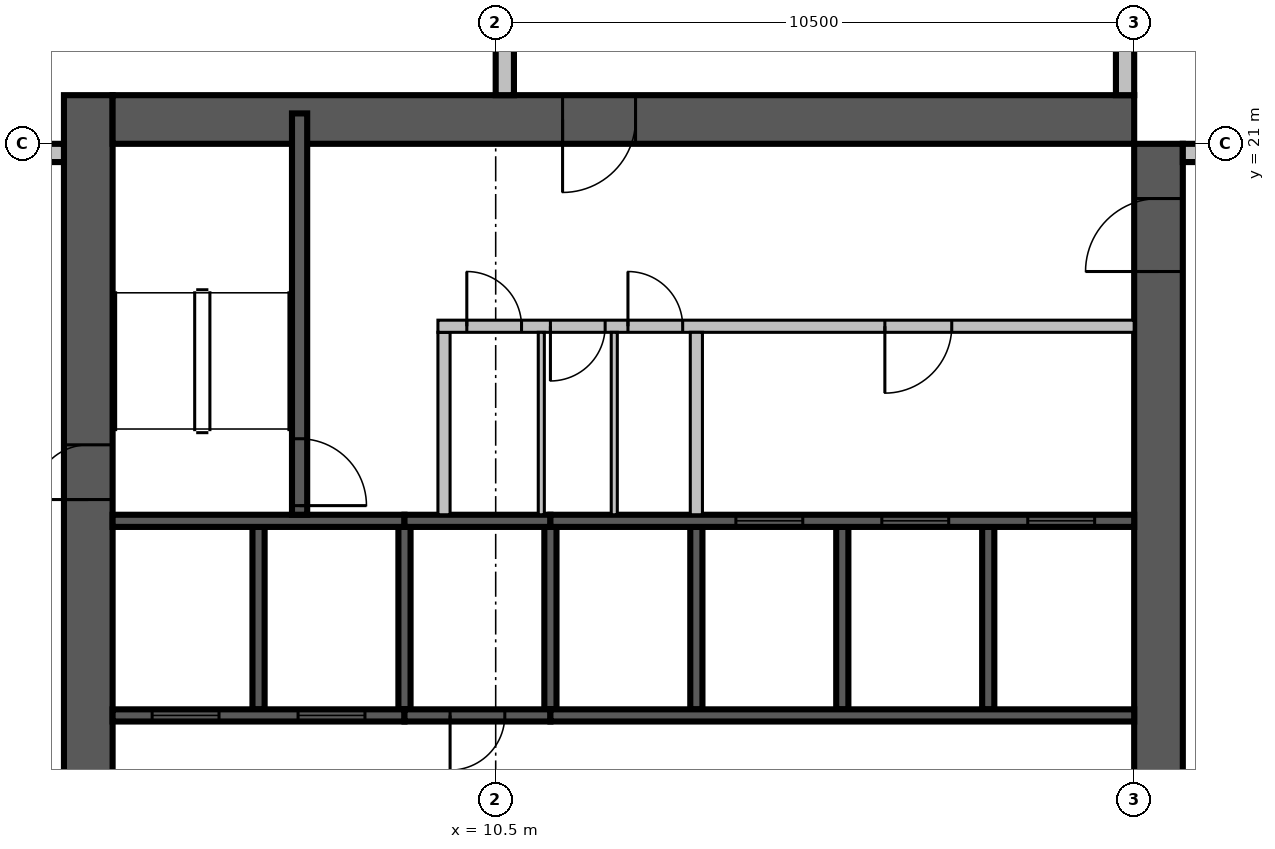
"""IFC4 building model, lengths in metres.
Left out: names, types, materials, properties, quantities, classifications, styles, units other than length and angle.
Written with IfcOpenShell. Run it as: python <this file> out.ifc"""

import sys

from ifc_helpers import new_model, si_unit, direction, frame, frame_2d, origin, place, context, subcontext, project, spatial, rectangle, extrude, source, transform, mapped, element, fill, save


model = new_model("IFC4")
c1 = context("Model", 3, precision=1e-05, world=origin(), true_north=direction((0.0, 1.0)))
c2 = subcontext(c1, "Body", "Model", "MODEL_VIEW")
j1 = project(units=[si_unit("LENGTHUNIT", "METRE"), si_unit("PLANEANGLEUNIT", "RADIAN")], contexts=[c1])
p1 = place(None, origin())
s1 = spatial("IfcSite", under=j1, at=p1, CompositionType="ELEMENT")
p2 = place(p1, origin())
s2 = spatial("IfcBuilding", under=s1, at=p2, CompositionType="ELEMENT")
p3 = place(p2, frame((0.0, 0.0, 193.0)))
s3 = spatial("IfcBuildingStorey", under=s2, at=p3, CompositionType="ELEMENT", Elevation=193.0)
m1 = source(origin(), c2, "Body", "SweptSolid", [
    extrude(rectangle(XDim=17.6, YDim=0.8, at=frame_2d((8.8, 0.0))), origin(), (0.0, 0.0, 1.0), 3.8),
])
p4 = place(p3, frame((3.8, 4.2, 0.0), z_axis=(0.0, 0.0, 1.0), x_axis=(0.0, 1.0, 0.0)))
e1 = element("IfcWall", 1, at=p4, inside=s3, PredefinedType="SHEAR", context=c2, shape_type="MappedRepresentation", body=[
    mapped(m1, transform((0.0, 0.0, 0.0), scale=1.0)),
])
m2 = source(origin(), c2, "Body", "SweptSolid", [
    extrude(rectangle(XDim=2.2, YDim=2.1, at=frame_2d((1.1, 1.05))), frame((0.0, 0.41, 0.0), z_axis=(0.0, -1.0, 0.0), x_axis=(1.0, 0.0, 0.0)), (0.0, 0.0, 1.0), 0.82),
])
p5 = place(p4, frame((4.2, 0.0, 0.0)))
e2 = element("IfcOpeningElement", 2, at=p5, cuts=e1, PredefinedType="OPENING", context=c2, shape_type="MappedRepresentation", body=[
    mapped(m2, transform((0.0, 0.0, 0.0), scale=1.0)),
])
m3 = source(origin(), c2, "Body", "SweptSolid", [
    extrude(rectangle(XDim=0.9, YDim=2.1, at=frame_2d((0.45, 1.05))), frame((0.0, 0.41, 0.0), z_axis=(0.0, -1.0, 0.0), x_axis=(1.0, 0.0, 0.0)), (0.0, 0.0, 1.0), 0.82),
])
p6 = place(p4, frame((10.95, 0.0, 0.0)))
e3 = element("IfcOpeningElement", 3, at=p6, cuts=e1, PredefinedType="OPENING", context=c2, shape_type="MappedRepresentation", body=[
    mapped(m3, transform((0.0, 0.0, 0.0), scale=1.0)),
])
m4 = source(origin(), c2, "Body", "SweptSolid", [
    extrude(rectangle(XDim=16.8, YDim=0.8, at=frame_2d((8.4, 0.0))), origin(), (0.0, 0.0, 1.0), 3.8),
])
p7 = place(p3, frame((21.4, 4.2, 0.0), z_axis=(0.0, 0.0, 1.0), x_axis=(0.0, 1.0, 0.0)))
e4 = element("IfcWall", 4, at=p7, inside=s3, PredefinedType="SHEAR", context=c2, shape_type="MappedRepresentation", body=[
    mapped(m4, transform((0.0, 0.0, 0.0), scale=1.0)),
])
p8 = place(p7, frame((4.2, 0.0, 0.0)))
e5 = element("IfcOpeningElement", 5, at=p8, cuts=e4, PredefinedType="OPENING", context=c2, shape_type="MappedRepresentation", body=[
    mapped(m2, transform((0.0, 0.0, 0.0), scale=1.0)),
])
m5 = source(origin(), c2, "Body", "SweptSolid", [
    extrude(rectangle(XDim=1.2, YDim=2.1, at=frame_2d((0.6, 1.05))), frame((0.0, 0.41, 0.0), z_axis=(0.0, -1.0, 0.0), x_axis=(1.0, 0.0, 0.0)), (0.0, 0.0, 1.0), 0.82),
])
p9 = place(p7, frame((14.7, 0.0, 0.0)))
e6 = element("IfcOpeningElement", 6, at=p9, cuts=e4, PredefinedType="OPENING", context=c2, shape_type="MappedRepresentation", body=[
    mapped(m5, transform((0.0, 0.0, 0.0), scale=1.0)),
])
p10 = place(p3, frame((4.2, 21.4, 0.0), z_axis=(0.0, 0.0, 1.0), x_axis=(1.0, 0.0, 0.0)))
e7 = element("IfcWall", 7, at=p10, inside=s3, PredefinedType="SHEAR", context=c2, shape_type="MappedRepresentation", body=[
    mapped(m4, transform((0.0, 0.0, 0.0), scale=1.0)),
])
p11 = place(p10, frame((7.4, 0.0, 0.0)))
e8 = element("IfcOpeningElement", 8, at=p11, cuts=e7, PredefinedType="OPENING", context=c2, shape_type="MappedRepresentation", body=[
    mapped(m5, transform((0.0, 0.0, 0.0), scale=1.0)),
])
m6 = source(origin(), c2, "Body", "SweptSolid", [
    extrude(rectangle(XDim=7.15, YDim=0.3, at=frame_2d((3.575, 0.0))), origin(), (0.0, 0.0, 1.0), 3.4),
])
p12 = place(p3, frame((28.95, 20.85, 0.0), z_axis=(0.0, 0.0, 1.0), x_axis=(-1.0, 0.0, 0.0)))
e9 = element("IfcWall", 9, at=p12, inside=s3, PredefinedType="STANDARD", context=c2, shape_type="MappedRepresentation", body=[
    mapped(m6, transform((0.0, 0.0, 0.0), scale=1.0)),
])
m7 = source(origin(), c2, "Body", "SweptSolid", [
    extrude(rectangle(XDim=3.0, YDim=2.3, at=frame_2d((1.5, 1.15))), frame((0.0, 0.16, 0.0), z_axis=(0.0, -1.0, 0.0), x_axis=(1.0, 0.0, 0.0)), (0.0, 0.0, 1.0), 0.32),
])
p13 = place(p12, frame((0.15, 0.0, 0.6)))
e10 = element("IfcOpeningElement", 10, at=p13, cuts=e9, PredefinedType="OPENING", context=c2, shape_type="MappedRepresentation", body=[
    mapped(m7, transform((0.0, 0.0, 0.0), scale=1.0)),
])
p14 = place(p3, frame((20.85, 21.8, 0.0), z_axis=(0.0, 0.0, 1.0), x_axis=(0.0, 1.0, 0.0)))
e11 = element("IfcWall", 11, at=p14, inside=s3, PredefinedType="STANDARD", context=c2, shape_type="MappedRepresentation", body=[
    mapped(m6, transform((0.0, 0.0, 0.0), scale=1.0)),
])
p15 = place(p14, frame((4.0, 0.0, 0.6)))
e12 = element("IfcOpeningElement", 12, at=p15, cuts=e11, PredefinedType="OPENING", context=c2, shape_type="MappedRepresentation", body=[
    mapped(m7, transform((0.0, 0.0, 0.0), scale=1.0)),
])
p16 = place(p3, frame((10.65, 28.95, 0.0), z_axis=(0.0, 0.0, 1.0), x_axis=(0.0, -1.0, 0.0)))
e13 = element("IfcWall", 13, at=p16, inside=s3, PredefinedType="STANDARD", context=c2, shape_type="MappedRepresentation", body=[
    mapped(m6, transform((0.0, 0.0, 0.0), scale=1.0)),
])
m8 = source(origin(), c2, "Body", "SweptSolid", [
    extrude(rectangle(XDim=1.8, YDim=2.3, at=frame_2d((0.9, 1.15))), frame((0.0, 0.16, 0.0), z_axis=(0.0, -1.0, 0.0), x_axis=(1.0, 0.0, 0.0)), (0.0, 0.0, 1.0), 0.32),
])
p17 = place(p16, frame((0.15, 0.0, 0.6)))
e14 = element("IfcOpeningElement", 14, at=p17, cuts=e13, PredefinedType="OPENING", context=c2, shape_type="MappedRepresentation", body=[
    mapped(m8, transform((0.0, 0.0, 0.0), scale=1.0)),
])
m9 = source(origin(), c2, "Body", "SweptSolid", [
    extrude(rectangle(XDim=1.2, YDim=2.3, at=frame_2d((0.6, 1.15))), frame((0.0, 0.16, 0.0), z_axis=(0.0, -1.0, 0.0), x_axis=(1.0, 0.0, 0.0)), (0.0, 0.0, 1.0), 0.32),
])
p18 = place(p16, frame((3.612, 0.0, 0.6)))
e15 = element("IfcOpeningElement", 15, at=p18, cuts=e13, PredefinedType="OPENING", context=c2, shape_type="MappedRepresentation", body=[
    mapped(m9, transform((0.0, 0.0, 0.0), scale=1.0)),
])
m10 = source(origin(), c2, "Body", "SweptSolid", [
    extrude(rectangle(XDim=2.5, YDim=0.3, at=frame_2d((1.25, 0.0))), origin(), (0.0, 0.0, 1.0), 3.4),
])
p19 = place(p3, frame((3.4, 20.85, 0.0), z_axis=(0.0, 0.0, 1.0), x_axis=(-1.0, 0.0, 0.0)))
e16 = element("IfcWall", 16, at=p19, inside=s3, PredefinedType="STANDARD", context=c2, shape_type="MappedRepresentation", body=[
    mapped(m10, transform((0.0, 0.0, 0.0), scale=1.0)),
])
p20 = place(p19, frame((0.4, 0.0, 0.6)))
e17 = element("IfcOpeningElement", 17, at=p20, cuts=e16, PredefinedType="OPENING", context=c2, shape_type="MappedRepresentation", body=[
    mapped(m8, transform((0.0, 0.0, 0.0), scale=1.0)),
])
m11 = source(origin(), c2, "Body", "SweptSolid", [
    extrude(rectangle(XDim=3.0, YDim=0.2, at=frame_2d((1.5, 0.0))), origin(), (0.0, 0.0, 1.0), 3.8),
])
p21 = place(p3, frame((6.6, 11.7, 0.0), z_axis=(0.0, 0.0, 1.0), x_axis=(0.0, 1.0, 0.0)))
e18 = element("IfcWall", 18, at=p21, inside=s3, PredefinedType="SOLIDWALL", context=c2, shape_type="MappedRepresentation", body=[
    mapped(m11, transform((0.0, 0.0, 0.0), scale=1.0)),
])
m12 = source(origin(), c2, "Body", "SweptSolid", [
    extrude(rectangle(XDim=3.0, YDim=0.2, at=frame_2d((1.5, 0.0))), origin(), (0.0, 0.0, 1.0), 3.4),
])
for number, where, z_axis, x_axis in (
    (19, (9.0, 11.7, 0.0), (0.0, 0.0, 1.0), (0.0, 1.0, 0.0)),
    (20, (11.4, 11.7, 0.0), (0.0, 0.0, 1.0), (0.0, 1.0, 0.0)),
):
    element("IfcWall", number, at=place(p3, frame(where, z_axis=z_axis, x_axis=x_axis)), inside=s3, PredefinedType="SOLIDWALL", context=c2, shape_type="MappedRepresentation", body=[
        mapped(m12, transform((0.0, 0.0, 0.0), scale=1.0)),
    ])
for number, where, z_axis, x_axis in (
    (21, (13.8, 11.7, 0.0), (0.0, 0.0, 1.0), (0.0, 1.0, 0.0)),
    (22, (16.2, 11.7, 0.0), (0.0, 0.0, 1.0), (0.0, 1.0, 0.0)),
    (23, (18.6, 11.7, 0.0), (0.0, 0.0, 1.0), (0.0, 1.0, 0.0)),
):
    element("IfcWall", number, at=place(p3, frame(where, z_axis=z_axis, x_axis=x_axis)), inside=s3, PredefinedType="SOLIDWALL", context=c2, shape_type="MappedRepresentation", body=[
        mapped(m11, transform((0.0, 0.0, 0.0), scale=1.0)),
    ])
m13 = source(origin(), c2, "Body", "SweptSolid", [
    extrude(rectangle(XDim=4.8, YDim=0.2, at=frame_2d((2.4, 0.0))), origin(), (0.0, 0.0, 1.0), 3.8),
])
p22 = place(p3, frame((4.2, 11.6, 0.0), z_axis=(0.0, 0.0, 1.0), x_axis=(1.0, 0.0, 0.0)))
e24 = element("IfcWall", 24, at=p22, inside=s3, PredefinedType="SOLIDWALL", context=c2, shape_type="MappedRepresentation", body=[
    mapped(m13, transform((0.0, 0.0, 0.0), scale=1.0)),
])
m14 = source(origin(), c2, "Body", "SweptSolid", [
    extrude(rectangle(XDim=1.1, YDim=2.1, at=frame_2d((0.55, 1.05))), frame((0.0, 0.11, 0.0), z_axis=(0.0, -1.0, 0.0), x_axis=(1.0, 0.0, 0.0)), (0.0, 0.0, 1.0), 0.22),
])
p23 = place(p22, frame((0.65, 0.0, 0.0)))
e25 = element("IfcOpeningElement", 25, at=p23, cuts=e24, PredefinedType="OPENING", context=c2, shape_type="MappedRepresentation", body=[
    mapped(m14, transform((0.0, 0.0, 0.0), scale=1.0)),
])
p24 = place(p22, frame((3.05, 0.0, 0.0)))
e26 = element("IfcOpeningElement", 26, at=p24, cuts=e24, PredefinedType="OPENING", context=c2, shape_type="MappedRepresentation", body=[
    mapped(m14, transform((0.0, 0.0, 0.0), scale=1.0)),
])
m15 = source(origin(), c2, "Body", "SweptSolid", [
    extrude(rectangle(XDim=2.4, YDim=0.2, at=frame_2d((1.2, 0.0))), origin(), (0.0, 0.0, 1.0), 3.4),
])
p25 = place(p3, frame((9.0, 11.6, 0.0), z_axis=(0.0, 0.0, 1.0), x_axis=(1.0, 0.0, 0.0)))
e27 = element("IfcWall", 27, at=p25, inside=s3, PredefinedType="SOLIDWALL", context=c2, shape_type="MappedRepresentation", body=[
    mapped(m15, transform((0.0, 0.0, 0.0), scale=1.0)),
])
m16 = source(origin(), c2, "Body", "SweptSolid", [
    extrude(rectangle(XDim=0.9, YDim=2.1, at=frame_2d((0.45, 1.05))), frame((0.0, 0.11, 0.0), z_axis=(0.0, -1.0, 0.0), x_axis=(1.0, 0.0, 0.0)), (0.0, 0.0, 1.0), 0.22),
])
p26 = place(p25, frame((0.75, 0.0, 0.0)))
e28 = element("IfcOpeningElement", 28, at=p26, cuts=e27, PredefinedType="OPENING", context=c2, shape_type="MappedRepresentation", body=[
    mapped(m16, transform((0.0, 0.0, 0.0), scale=1.0)),
])
m17 = source(origin(), c2, "Body", "SweptSolid", [
    extrude(rectangle(XDim=9.6, YDim=0.2, at=frame_2d((4.8, 0.0))), origin(), (0.0, 0.0, 1.0), 3.8),
])
p27 = place(p3, frame((11.4, 11.6, 0.0), z_axis=(0.0, 0.0, 1.0), x_axis=(1.0, 0.0, 0.0)))
e29 = element("IfcWall", 29, at=p27, inside=s3, PredefinedType="SOLIDWALL", context=c2, shape_type="MappedRepresentation", body=[
    mapped(m17, transform((0.0, 0.0, 0.0), scale=1.0)),
])
p28 = place(p3, frame((4.2, 14.8, 0.0), z_axis=(0.0, 0.0, 1.0), x_axis=(1.0, 0.0, 0.0)))
e30 = element("IfcWall", 30, at=p28, inside=s3, PredefinedType="SOLIDWALL", context=c2, shape_type="MappedRepresentation", body=[
    mapped(m13, transform((0.0, 0.0, 0.0), scale=1.0)),
])
p29 = place(p3, frame((9.0, 14.8, 0.0), z_axis=(0.0, 0.0, 1.0), x_axis=(1.0, 0.0, 0.0)))
e31 = element("IfcWall", 31, at=p29, inside=s3, PredefinedType="SOLIDWALL", context=c2, shape_type="MappedRepresentation", body=[
    mapped(m15, transform((0.0, 0.0, 0.0), scale=1.0)),
])
p30 = place(p3, frame((11.4, 14.8, 0.0), z_axis=(0.0, 0.0, 1.0), x_axis=(1.0, 0.0, 0.0)))
e32 = element("IfcWall", 32, at=p30, inside=s3, PredefinedType="SOLIDWALL", context=c2, shape_type="MappedRepresentation", body=[
    mapped(m17, transform((0.0, 0.0, 0.0), scale=1.0)),
])
p31 = place(p30, frame((3.05, 0.0, 0.0)))
e33 = element("IfcOpeningElement", 33, at=p31, cuts=e32, PredefinedType="OPENING", context=c2, shape_type="MappedRepresentation", body=[
    mapped(m14, transform((0.0, 0.0, 0.0), scale=1.0)),
])
p32 = place(p30, frame((5.45, 0.0, 0.0)))
e34 = element("IfcOpeningElement", 34, at=p32, cuts=e32, PredefinedType="OPENING", context=c2, shape_type="MappedRepresentation", body=[
    mapped(m14, transform((0.0, 0.0, 0.0), scale=1.0)),
])
p33 = place(p30, frame((7.85, 0.0, 0.0)))
e35 = element("IfcOpeningElement", 35, at=p33, cuts=e32, PredefinedType="OPENING", context=c2, shape_type="MappedRepresentation", body=[
    mapped(m14, transform((0.0, 0.0, 0.0), scale=1.0)),
])
m18 = source(origin(), c2, "Body", "SweptSolid", [
    extrude(rectangle(XDim=6.6, YDim=0.25, at=frame_2d((3.3, 0.0))), origin(), (0.0, 0.0, 1.0), 3.4),
])
p34 = place(p3, frame((7.275, 14.9, 0.0), z_axis=(0.0, 0.0, 1.0), x_axis=(0.0, 1.0, 0.0)))
e36 = element("IfcWall", 36, at=p34, inside=s3, PredefinedType="SOLIDWALL", context=c2, shape_type="MappedRepresentation", body=[
    mapped(m18, transform((0.0, 0.0, 0.0), scale=1.0)),
])
m19 = source(origin(), c2, "Body", "SweptSolid", [
    extrude(rectangle(XDim=1.1, YDim=2.1, at=frame_2d((0.55, 1.05))), frame((0.0, 0.135, 0.0), z_axis=(0.0, -1.0, 0.0), x_axis=(1.0, 0.0, 0.0)), (0.0, 0.0, 1.0), 0.27),
])
p35 = place(p34, frame((0.15, 0.0, 0.0)))
e37 = element("IfcOpeningElement", 37, at=p35, cuts=e36, PredefinedType="OPENING", context=c2, shape_type="MappedRepresentation", body=[
    mapped(m19, transform((0.0, 0.0, 0.0), scale=1.0)),
])
m20 = source(origin(), c2, "Body", "SweptSolid", [
    extrude(rectangle(XDim=3.0, YDim=0.2, at=frame_2d((1.5, 0.0))), origin(), (0.0, 0.0, 1.0), 3.4),
])
p36 = place(p3, frame((9.65, 14.9, 0.0), z_axis=(0.0, 0.0, 1.0), x_axis=(0.0, 1.0, 0.0)))
e38 = element("IfcWall", 38, at=p36, inside=s3, PredefinedType="PARTITIONING", context=c2, shape_type="MappedRepresentation", body=[
    mapped(m20, transform((0.0, 0.0, 0.0), scale=1.0)),
])
m21 = source(origin(), c2, "Body", "SweptSolid", [
    extrude(rectangle(XDim=11.45, YDim=0.2, at=frame_2d((5.725, 0.0))), origin(), (0.0, 0.0, 1.0), 3.4),
])
p37 = place(p3, frame((9.55, 18.0, 0.0), z_axis=(0.0, 0.0, 1.0), x_axis=(1.0, 0.0, 0.0)))
e39 = element("IfcWall", 39, at=p37, inside=s3, PredefinedType="PARTITIONING", context=c2, shape_type="MappedRepresentation", body=[
    mapped(m21, transform((0.0, 0.0, 0.0), scale=1.0)),
])
p38 = place(p37, frame((0.475, 0.0, 0.0)))
e40 = element("IfcOpeningElement", 40, at=p38, cuts=e39, PredefinedType="OPENING", context=c2, shape_type="MappedRepresentation", body=[
    mapped(m16, transform((0.0, 0.0, 0.0), scale=1.0)),
])
p39 = place(p37, frame((1.85, 0.0, 0.0)))
e41 = element("IfcOpeningElement", 41, at=p39, cuts=e39, PredefinedType="OPENING", context=c2, shape_type="MappedRepresentation", body=[
    mapped(m16, transform((0.0, 0.0, 0.0), scale=1.0)),
])
p40 = place(p37, frame((3.125, 0.0, 0.0)))
e42 = element("IfcOpeningElement", 42, at=p40, cuts=e39, PredefinedType="OPENING", context=c2, shape_type="MappedRepresentation", body=[
    mapped(m16, transform((0.0, 0.0, 0.0), scale=1.0)),
])
p41 = place(p37, frame((7.35, 0.0, 0.0)))
e43 = element("IfcOpeningElement", 43, at=p41, cuts=e39, PredefinedType="OPENING", context=c2, shape_type="MappedRepresentation", body=[
    mapped(m14, transform((0.0, 0.0, 0.0), scale=1.0)),
])
p42 = place(p3, frame((13.8, 14.9, 0.0), z_axis=(0.0, 0.0, 1.0), x_axis=(0.0, 1.0, 0.0)))
e44 = element("IfcWall", 44, at=p42, inside=s3, PredefinedType="PARTITIONING", context=c2, shape_type="MappedRepresentation", body=[
    mapped(m20, transform((0.0, 0.0, 0.0), scale=1.0)),
])
m22 = source(origin(), c2, "Body", "SweptSolid", [
    extrude(rectangle(XDim=3.0, YDim=0.1, at=frame_2d((1.5, 0.0))), origin(), (0.0, 0.0, 1.0), 3.4),
])
for number, where, z_axis, x_axis in (
    (45, (11.25, 14.9, 0.0), (0.0, 0.0, 1.0), (0.0, 1.0, 0.0)),
    (46, (12.45, 14.9, 0.0), (0.0, 0.0, 1.0), (0.0, 1.0, 0.0)),
):
    element("IfcWall", number, at=place(p3, frame(where, z_axis=z_axis, x_axis=x_axis)), inside=s3, PredefinedType="PARTITIONING", context=c2, shape_type="MappedRepresentation", body=[
        mapped(m22, transform((0.0, 0.0, 0.0), scale=1.0)),
    ])
m23 = source(origin(), c2, "Body", "SweptSolid", [
    extrude(rectangle(XDim=1.1, YDim=2.1, at=frame_2d((0.55, 1.05))), frame((0.0, 0.025, 0.0), z_axis=(0.0, -1.0, 0.0), x_axis=(1.0, 0.0, 0.0)), (0.0, 0.0, 1.0), 0.05),
])
p43 = place(p23, origin())
e47 = element("IfcDoor", 47, at=p43, inside=s3, OperationType="SLIDING_TO_LEFT", PredefinedType="DOOR", context=c2, shape_type="MappedRepresentation", body=[
    mapped(m23, transform((0.0, 0.0, 0.0), scale=1.0)),
])
fill(e25, e47)
p44 = place(p24, origin())
e48 = element("IfcDoor", 48, at=p44, inside=s3, OperationType="SLIDING_TO_LEFT", PredefinedType="DOOR", context=c2, shape_type="MappedRepresentation", body=[
    mapped(m23, transform((0.0, 0.0, 0.0), scale=1.0)),
])
fill(e26, e48)
m24 = source(origin(), c2, "Body", "SweptSolid", [
    extrude(rectangle(XDim=0.9, YDim=2.1, at=frame_2d((0.45, 1.05))), frame((0.0, 0.025, 0.0), z_axis=(0.0, -1.0, 0.0), x_axis=(1.0, 0.0, 0.0)), (0.0, 0.0, 1.0), 0.05),
])
p45 = place(p26, origin())
e49 = element("IfcDoor", 49, at=p45, inside=s3, OperationType="SINGLE_SWING_RIGHT", PredefinedType="DOOR", context=c2, shape_type="MappedRepresentation", body=[
    mapped(m24, transform((0.0, 0.0, 0.0), scale=1.0)),
])
fill(e28, e49)
p46 = place(p31, origin())
e50 = element("IfcDoor", 50, at=p46, inside=s3, OperationType="SLIDING_TO_LEFT", PredefinedType="DOOR", context=c2, shape_type="MappedRepresentation", body=[
    mapped(m23, transform((0.0, 0.0, 0.0), scale=1.0)),
])
fill(e33, e50)
p47 = place(p32, origin())
e51 = element("IfcDoor", 51, at=p47, inside=s3, OperationType="SLIDING_TO_LEFT", PredefinedType="DOOR", context=c2, shape_type="MappedRepresentation", body=[
    mapped(m23, transform((0.0, 0.0, 0.0), scale=1.0)),
])
fill(e34, e51)
p48 = place(p33, origin())
e52 = element("IfcDoor", 52, at=p48, inside=s3, OperationType="SLIDING_TO_LEFT", PredefinedType="DOOR", context=c2, shape_type="MappedRepresentation", body=[
    mapped(m23, transform((0.0, 0.0, 0.0), scale=1.0)),
])
fill(e35, e52)
p49 = place(p35, origin())
e53 = element("IfcDoor", 53, at=p49, inside=s3, OperationType="SINGLE_SWING_RIGHT", PredefinedType="DOOR", context=c2, shape_type="MappedRepresentation", body=[
    mapped(m23, transform((0.0, 0.0, 0.0), scale=1.0)),
])
fill(e37, e53)
p50 = place(p38, origin())
e54 = element("IfcDoor", 54, at=p50, inside=s3, OperationType="SINGLE_SWING_LEFT", PredefinedType="DOOR", context=c2, shape_type="MappedRepresentation", body=[
    mapped(m24, transform((0.0, 0.0, 0.0), scale=1.0)),
])
fill(e40, e54)
p51 = place(p39, origin())
e55 = element("IfcDoor", 55, at=p51, inside=s3, OperationType="SINGLE_SWING_RIGHT", PredefinedType="DOOR", context=c2, shape_type="MappedRepresentation", body=[
    mapped(m24, transform((0.0, 0.0, 0.0), scale=1.0)),
])
fill(e41, e55)
p52 = place(p40, origin())
e56 = element("IfcDoor", 56, at=p52, inside=s3, OperationType="SINGLE_SWING_LEFT", PredefinedType="DOOR", context=c2, shape_type="MappedRepresentation", body=[
    mapped(m24, transform((0.0, 0.0, 0.0), scale=1.0)),
])
fill(e42, e56)
p53 = place(p41, origin())
e57 = element("IfcDoor", 57, at=p53, inside=s3, OperationType="SINGLE_SWING_RIGHT", PredefinedType="DOOR", context=c2, shape_type="MappedRepresentation", body=[
    mapped(m23, transform((0.0, 0.0, 0.0), scale=1.0)),
])
fill(e43, e57)
m25 = source(origin(), c2, "Body", "SweptSolid", [
    extrude(rectangle(XDim=1.2, YDim=2.1, at=frame_2d((0.6, 1.05))), frame((0.0, 0.025, 0.0), z_axis=(0.0, -1.0, 0.0), x_axis=(1.0, 0.0, 0.0)), (0.0, 0.0, 1.0), 0.05),
])
p54 = place(p11, origin())
e58 = element("IfcDoor", 58, at=p54, inside=s3, OperationType="SINGLE_SWING_RIGHT", PredefinedType="DOOR", context=c2, shape_type="MappedRepresentation", body=[
    mapped(m25, transform((0.0, 0.0, 0.0), scale=1.0)),
])
fill(e8, e58)
p55 = place(p9, origin())
e59 = element("IfcDoor", 59, at=p55, inside=s3, OperationType="SINGLE_SWING_LEFT", PredefinedType="DOOR", context=c2, shape_type="MappedRepresentation", body=[
    mapped(m25, transform((0.0, 0.0, 0.0), scale=1.0)),
])
fill(e6, e59)
p56 = place(p6, origin())
e60 = element("IfcDoor", 60, at=p56, inside=s3, OperationType="SINGLE_SWING_LEFT", PredefinedType="DOOR", context=c2, shape_type="MappedRepresentation", body=[
    mapped(m24, transform((0.0, 0.0, 0.0), scale=1.0)),
])
fill(e3, e60)
save(model, sys.argv[1])
